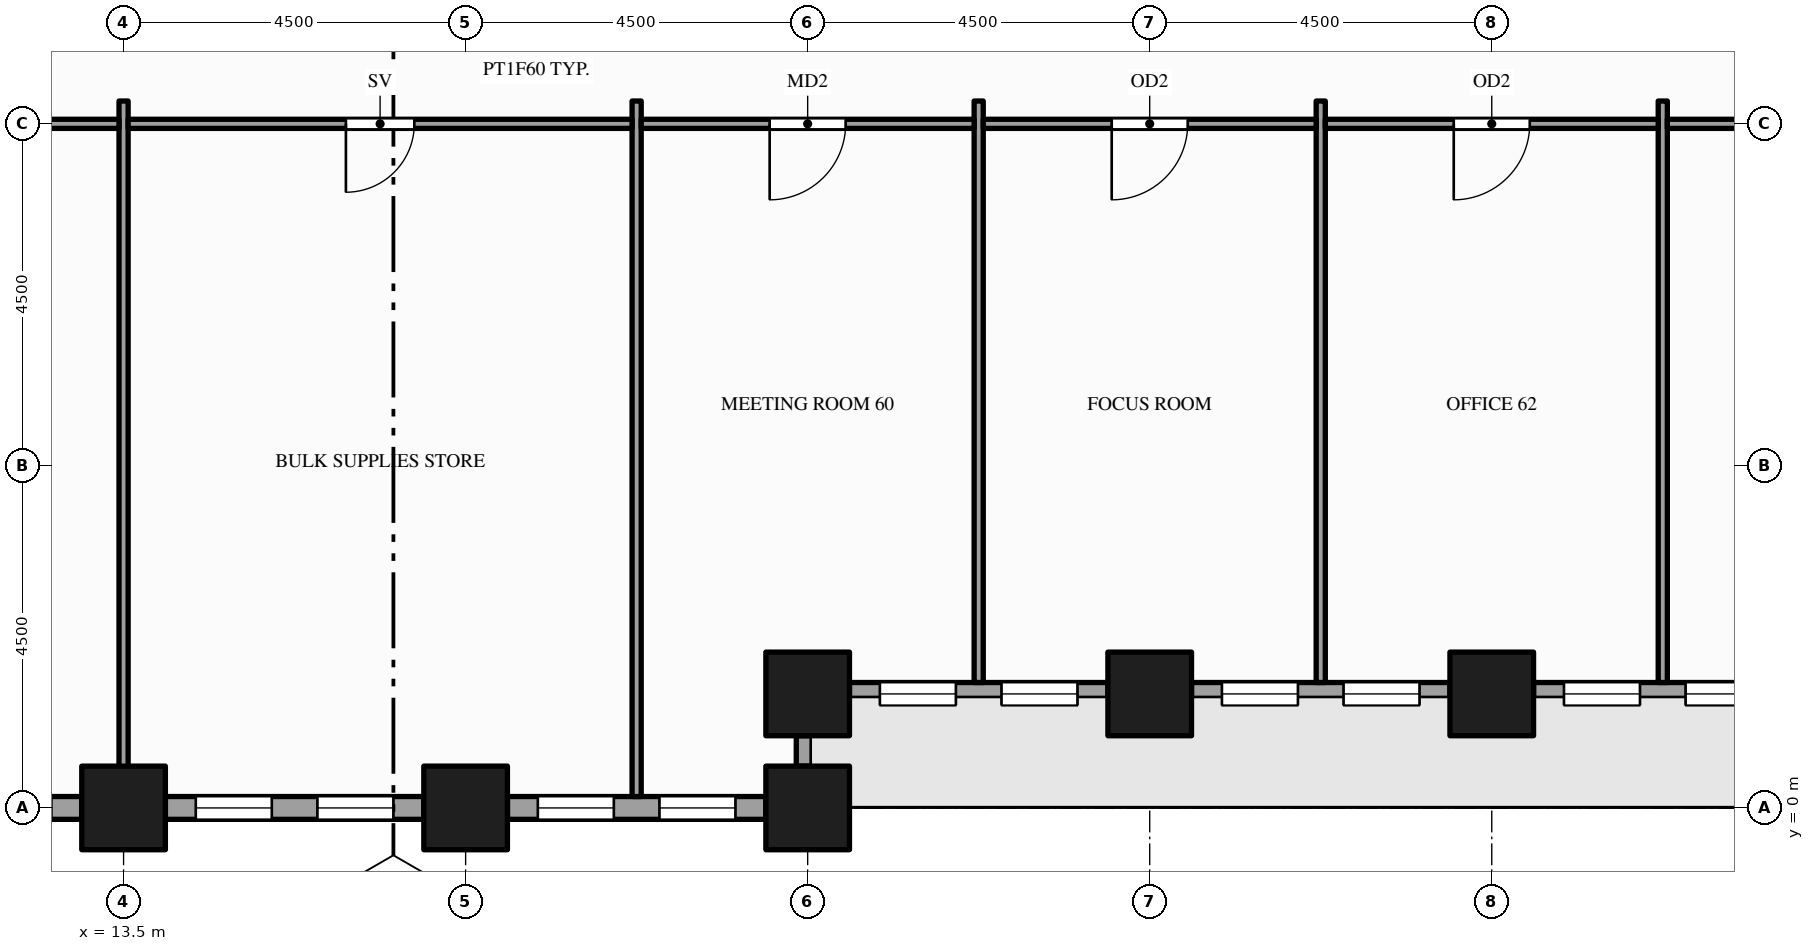
"""IFC4 building model, lengths in metres.
Left out: names, types, materials, properties, quantities, classifications, styles, units other than length and angle.
Written with IfcOpenShell. Run it as: python <this file> out.ifc"""

import sys

from ifc_helpers import new_model, si_unit, direction, frame, frame_2d, origin, origin_2d, place, context, subcontext, project, spatial, rectangle, hollow_rectangle, extrude, element, fill, save


model = new_model("IFC4")
c1 = context("Model", 3, precision=1e-05, world=origin(), true_north=direction((0.0, 1.0)))
c2 = subcontext(c1, "Body", "Model", "MODEL_VIEW")
j1 = project(units=[si_unit("LENGTHUNIT", "METRE"), si_unit("PLANEANGLEUNIT", "RADIAN")], contexts=[c1])
p1 = place(None, origin())
s1 = spatial("IfcSite", under=j1, at=p1, CompositionType="ELEMENT")
p2 = place(p1, origin())
s2 = spatial("IfcBuilding", under=s1, at=p2, CompositionType="ELEMENT")
p3 = place(p2, frame((0.0, 0.0, 29.0)))
s3 = spatial("IfcBuildingStorey", under=s2, at=p3, CompositionType="ELEMENT", Elevation=29.0)
for number, where, z_axis, x_axis in (
    (1, (13.5, 0.0, -0.15), (0.0, 0.0, 1.0), (1.0, 0.0, 0.0)),
    (2, (18.0, 0.0, -0.15), (0.0, 0.0, 1.0), (1.0, 0.0, 0.0)),
):
    element("IfcColumn", number, at=place(p3, frame(where, z_axis=z_axis, x_axis=x_axis)), inside=s3, PredefinedType="COLUMN", context=c2, shape_type="SweptSolid", body=[
        extrude(hollow_rectangle(XDim=1.1, YDim=1.1, WallThickness=0.06, at=origin_2d()), origin(), (0.0, 0.0, 1.0), 4.0),
    ])
for number, where, z_axis, x_axis in (
    (3, (22.5, 0.0, -0.3), (0.0, 0.0, 1.0), (1.0, 0.0, 0.0)),
    (4, (22.5, 1.5, -0.3), (0.0, 0.0, 1.0), (1.0, 0.0, 0.0)),
    (5, (27.0, 1.5, -0.3), (0.0, 0.0, 1.0), (1.0, 0.0, 0.0)),
    (6, (31.5, 1.5, -0.3), (0.0, 0.0, 1.0), (1.0, 0.0, 0.0)),
):
    element("IfcColumn", number, at=place(p3, frame(where, z_axis=z_axis, x_axis=x_axis)), inside=s3, PredefinedType="COLUMN", context=c2, shape_type="SweptSolid", body=[
        extrude(hollow_rectangle(XDim=1.1, YDim=1.1, WallThickness=0.06, at=origin_2d()), origin(), (0.0, 0.0, 1.0), 4.15),
    ])
p4 = place(p3, frame((9.55, 0.0, 0.0), z_axis=(0.0, 0.0, 1.0), x_axis=(1.0, 0.0, 0.0)))
e7 = element("IfcWall", 7, at=p4, inside=s3, PredefinedType="STANDARD", context=c2, shape_type="SweptSolid", body=[
    extrude(rectangle(XDim=3.4, YDim=0.3, at=frame_2d((1.7, 0.0))), origin(), (0.0, 0.0, 1.0), 3.144),
])
p5 = place(p4, frame((0.4, 0.0, 0.9)))
e8 = element("IfcOpeningElement", 8, at=p5, cuts=e7, PredefinedType="OPENING", context=c2, shape_type="SweptSolid", body=[
    extrude(rectangle(XDim=1.0, YDim=2.0, at=frame_2d((0.5, 1.0))), frame((0.0, 0.16, 0.0), z_axis=(0.0, -1.0, 0.0), x_axis=(1.0, 0.0, 0.0)), (0.0, 0.0, 1.0), 0.32),
])
p6 = place(p4, frame((2.0, 0.0, 0.9)))
e9 = element("IfcOpeningElement", 9, at=p6, cuts=e7, PredefinedType="OPENING", context=c2, shape_type="SweptSolid", body=[
    extrude(rectangle(XDim=1.0, YDim=2.0, at=frame_2d((0.5, 1.0))), frame((0.0, 0.16, 0.0), z_axis=(0.0, -1.0, 0.0), x_axis=(1.0, 0.0, 0.0)), (0.0, 0.0, 1.0), 0.32),
])
p7 = place(p3, frame((14.05, 0.0, 0.0), z_axis=(0.0, 0.0, 1.0), x_axis=(1.0, 0.0, 0.0)))
e10 = element("IfcWall", 10, at=p7, inside=s3, PredefinedType="STANDARD", context=c2, shape_type="SweptSolid", body=[
    extrude(rectangle(XDim=3.4, YDim=0.3, at=frame_2d((1.7, 0.0))), origin(), (0.0, 0.0, 1.0), 3.144),
])
p8 = place(p7, frame((0.4, 0.0, 0.9)))
e11 = element("IfcOpeningElement", 11, at=p8, cuts=e10, PredefinedType="OPENING", context=c2, shape_type="SweptSolid", body=[
    extrude(rectangle(XDim=1.0, YDim=2.0, at=frame_2d((0.5, 1.0))), frame((0.0, 0.16, 0.0), z_axis=(0.0, -1.0, 0.0), x_axis=(1.0, 0.0, 0.0)), (0.0, 0.0, 1.0), 0.32),
])
p9 = place(p7, frame((2.0, 0.0, 0.9)))
e12 = element("IfcOpeningElement", 12, at=p9, cuts=e10, PredefinedType="OPENING", context=c2, shape_type="SweptSolid", body=[
    extrude(rectangle(XDim=1.0, YDim=2.0, at=frame_2d((0.5, 1.0))), frame((0.0, 0.16, 0.0), z_axis=(0.0, -1.0, 0.0), x_axis=(1.0, 0.0, 0.0)), (0.0, 0.0, 1.0), 0.32),
])
p10 = place(p3, frame((18.55, 0.0, 0.0), z_axis=(0.0, 0.0, 1.0), x_axis=(1.0, 0.0, 0.0)))
e13 = element("IfcWall", 13, at=p10, inside=s3, PredefinedType="STANDARD", context=c2, shape_type="SweptSolid", body=[
    extrude(rectangle(XDim=3.4, YDim=0.3, at=frame_2d((1.7, 0.0))), origin(), (0.0, 0.0, 1.0), 3.144),
])
p11 = place(p10, frame((0.4, 0.0, 0.9)))
e14 = element("IfcOpeningElement", 14, at=p11, cuts=e13, PredefinedType="OPENING", context=c2, shape_type="SweptSolid", body=[
    extrude(rectangle(XDim=1.0, YDim=2.0, at=frame_2d((0.5, 1.0))), frame((0.0, 0.16, 0.0), z_axis=(0.0, -1.0, 0.0), x_axis=(1.0, 0.0, 0.0)), (0.0, 0.0, 1.0), 0.32),
])
p12 = place(p10, frame((2.0, 0.0, 0.9)))
e15 = element("IfcOpeningElement", 15, at=p12, cuts=e13, PredefinedType="OPENING", context=c2, shape_type="SweptSolid", body=[
    extrude(rectangle(XDim=1.0, YDim=2.0, at=frame_2d((0.5, 1.0))), frame((0.0, 0.16, 0.0), z_axis=(0.0, -1.0, 0.0), x_axis=(1.0, 0.0, 0.0)), (0.0, 0.0, 1.0), 0.32),
])
p13 = place(p3, frame((22.5, 0.55, 0.0), z_axis=(0.0, 0.0, 1.0), x_axis=(0.0, 1.0, 0.0)))
e16 = element("IfcWall", 16, at=p13, inside=s3, PredefinedType="STANDARD", context=c2, shape_type="SweptSolid", body=[
    extrude(rectangle(XDim=0.4, YDim=0.3, at=frame_2d((0.2, 0.0))), origin(), (0.0, 0.0, 1.0), 3.144),
])
p14 = place(p3, frame((23.05, 1.5, 0.0), z_axis=(0.0, 0.0, 1.0), x_axis=(1.0, 0.0, 0.0)))
e17 = element("IfcWall", 17, at=p14, inside=s3, PredefinedType="STANDARD", context=c2, shape_type="SweptSolid", body=[
    extrude(rectangle(XDim=3.4, YDim=0.3, at=frame_2d((1.7, 0.0))), origin(), (0.0, 0.0, 1.0), 3.144),
])
p15 = place(p14, frame((0.4, 0.0, 0.9)))
e18 = element("IfcOpeningElement", 18, at=p15, cuts=e17, PredefinedType="OPENING", context=c2, shape_type="SweptSolid", body=[
    extrude(rectangle(XDim=1.0, YDim=2.0, at=frame_2d((0.5, 1.0))), frame((0.0, 0.16, 0.0), z_axis=(0.0, -1.0, 0.0), x_axis=(1.0, 0.0, 0.0)), (0.0, 0.0, 1.0), 0.32),
])
p16 = place(p14, frame((2.0, 0.0, 0.9)))
e19 = element("IfcOpeningElement", 19, at=p16, cuts=e17, PredefinedType="OPENING", context=c2, shape_type="SweptSolid", body=[
    extrude(rectangle(XDim=1.0, YDim=2.0, at=frame_2d((0.5, 1.0))), frame((0.0, 0.16, 0.0), z_axis=(0.0, -1.0, 0.0), x_axis=(1.0, 0.0, 0.0)), (0.0, 0.0, 1.0), 0.32),
])
p17 = place(p3, frame((27.55, 1.5, 0.0), z_axis=(0.0, 0.0, 1.0), x_axis=(1.0, 0.0, 0.0)))
e20 = element("IfcWall", 20, at=p17, inside=s3, PredefinedType="STANDARD", context=c2, shape_type="SweptSolid", body=[
    extrude(rectangle(XDim=3.4, YDim=0.3, at=frame_2d((1.7, 0.0))), origin(), (0.0, 0.0, 1.0), 3.144),
])
p18 = place(p17, frame((0.4, 0.0, 0.9)))
e21 = element("IfcOpeningElement", 21, at=p18, cuts=e20, PredefinedType="OPENING", context=c2, shape_type="SweptSolid", body=[
    extrude(rectangle(XDim=1.0, YDim=2.0, at=frame_2d((0.5, 1.0))), frame((0.0, 0.16, 0.0), z_axis=(0.0, -1.0, 0.0), x_axis=(1.0, 0.0, 0.0)), (0.0, 0.0, 1.0), 0.32),
])
p19 = place(p17, frame((2.0, 0.0, 0.9)))
e22 = element("IfcOpeningElement", 22, at=p19, cuts=e20, PredefinedType="OPENING", context=c2, shape_type="SweptSolid", body=[
    extrude(rectangle(XDim=1.0, YDim=2.0, at=frame_2d((0.5, 1.0))), frame((0.0, 0.16, 0.0), z_axis=(0.0, -1.0, 0.0), x_axis=(1.0, 0.0, 0.0)), (0.0, 0.0, 1.0), 0.32),
])
p20 = place(p3, frame((32.05, 1.5, 0.0), z_axis=(0.0, 0.0, 1.0), x_axis=(1.0, 0.0, 0.0)))
e23 = element("IfcWall", 23, at=p20, inside=s3, PredefinedType="STANDARD", context=c2, shape_type="SweptSolid", body=[
    extrude(rectangle(XDim=3.4, YDim=0.3, at=frame_2d((1.7, 0.0))), origin(), (0.0, 0.0, 1.0), 3.144),
])
p21 = place(p20, frame((0.4, 0.0, 0.9)))
e24 = element("IfcOpeningElement", 24, at=p21, cuts=e23, PredefinedType="OPENING", context=c2, shape_type="SweptSolid", body=[
    extrude(rectangle(XDim=1.0, YDim=2.0, at=frame_2d((0.5, 1.0))), frame((0.0, 0.16, 0.0), z_axis=(0.0, -1.0, 0.0), x_axis=(1.0, 0.0, 0.0)), (0.0, 0.0, 1.0), 0.32),
])
p22 = place(p20, frame((2.0, 0.0, 0.9)))
e25 = element("IfcOpeningElement", 25, at=p22, cuts=e23, PredefinedType="OPENING", context=c2, shape_type="SweptSolid", body=[
    extrude(rectangle(XDim=1.0, YDim=2.0, at=frame_2d((0.5, 1.0))), frame((0.0, 0.16, 0.0), z_axis=(0.0, -1.0, 0.0), x_axis=(1.0, 0.0, 0.0)), (0.0, 0.0, 1.0), 0.32),
])
for number, where, z_axis, x_axis in (
    (26, (13.5, 0.15, 0.0), (0.0, 0.0, 1.0), (0.0, 1.0, 0.0)),
    (27, (20.25, 0.15, 0.0), (0.0, 0.0, 1.0), (0.0, 1.0, 0.0)),
):
    element("IfcWall", number, at=place(p3, frame(where, z_axis=z_axis, x_axis=x_axis)), inside=s3, PredefinedType="PARTITIONING", context=c2, shape_type="SweptSolid", body=[
        extrude(rectangle(XDim=9.15, YDim=0.12, at=frame_2d((4.575, 0.0))), origin(), (0.0, 0.0, 1.0), 2.938),
    ])
for number, where, z_axis, x_axis in (
    (28, (24.75, 1.65, 0.0), (0.0, 0.0, 1.0), (0.0, 1.0, 0.0)),
    (29, (29.25, 1.65, 0.0), (0.0, 0.0, 1.0), (0.0, 1.0, 0.0)),
    (30, (33.75, 1.65, 0.0), (0.0, 0.0, 1.0), (0.0, 1.0, 0.0)),
):
    element("IfcWall", number, at=place(p3, frame(where, z_axis=z_axis, x_axis=x_axis)), inside=s3, PredefinedType="PARTITIONING", context=c2, shape_type="SweptSolid", body=[
        extrude(rectangle(XDim=7.65, YDim=0.12, at=frame_2d((3.825, 0.0))), origin(), (0.0, 0.0, 1.0), 2.938),
    ])
p23 = place(p3, frame((9.06, 9.0, 0.0), z_axis=(0.0, 0.0, 1.0), x_axis=(1.0, 0.0, 0.0)))
e31 = element("IfcWall", 31, at=p23, inside=s3, PredefinedType="PARTITIONING", context=c2, shape_type="SweptSolid", body=[
    extrude(rectangle(XDim=4.38, YDim=0.12, at=frame_2d((2.19, 0.0))), origin(), (0.0, 0.0, 1.0), 2.938),
])
p24 = place(p23, frame((1.69, 0.0, 0.0)))
e32 = element("IfcOpeningElement", 32, at=p24, cuts=e31, PredefinedType="OPENING", context=c2, shape_type="SweptSolid", body=[
    extrude(rectangle(XDim=1.0, YDim=2.1, at=frame_2d((0.5, 1.05))), frame((0.0, 0.07, 0.0), z_axis=(0.0, -1.0, 0.0), x_axis=(1.0, 0.0, 0.0)), (0.0, 0.0, 1.0), 0.14),
])
p25 = place(p3, frame((13.56, 9.0, 0.0), z_axis=(0.0, 0.0, 1.0), x_axis=(1.0, 0.0, 0.0)))
e33 = element("IfcWall", 33, at=p25, inside=s3, PredefinedType="PARTITIONING", context=c2, shape_type="SweptSolid", body=[
    extrude(rectangle(XDim=6.63, YDim=0.12, at=frame_2d((3.315, 0.0))), origin(), (0.0, 0.0, 1.0), 2.938),
])
p26 = place(p25, frame((2.865, 0.0, 0.0)))
e34 = element("IfcOpeningElement", 34, at=p26, cuts=e33, PredefinedType="OPENING", context=c2, shape_type="SweptSolid", body=[
    extrude(rectangle(XDim=0.9, YDim=2.1, at=frame_2d((0.45, 1.05))), frame((0.0, 0.07, 0.0), z_axis=(0.0, -1.0, 0.0), x_axis=(1.0, 0.0, 0.0)), (0.0, 0.0, 1.0), 0.14),
])
p27 = place(p3, frame((20.31, 9.0, 0.0), z_axis=(0.0, 0.0, 1.0), x_axis=(1.0, 0.0, 0.0)))
e35 = element("IfcWall", 35, at=p27, inside=s3, PredefinedType="PARTITIONING", context=c2, shape_type="SweptSolid", body=[
    extrude(rectangle(XDim=4.38, YDim=0.12, at=frame_2d((2.19, 0.0))), origin(), (0.0, 0.0, 1.0), 2.938),
])
p28 = place(p27, frame((1.69, 0.0, 0.0)))
e36 = element("IfcOpeningElement", 36, at=p28, cuts=e35, PredefinedType="OPENING", context=c2, shape_type="SweptSolid", body=[
    extrude(rectangle(XDim=1.0, YDim=2.1, at=frame_2d((0.5, 1.05))), frame((0.0, 0.07, 0.0), z_axis=(0.0, -1.0, 0.0), x_axis=(1.0, 0.0, 0.0)), (0.0, 0.0, 1.0), 0.14),
])
p29 = place(p3, frame((24.81, 9.0, 0.0), z_axis=(0.0, 0.0, 1.0), x_axis=(1.0, 0.0, 0.0)))
e37 = element("IfcWall", 37, at=p29, inside=s3, PredefinedType="PARTITIONING", context=c2, shape_type="SweptSolid", body=[
    extrude(rectangle(XDim=4.38, YDim=0.12, at=frame_2d((2.19, 0.0))), origin(), (0.0, 0.0, 1.0), 2.938),
])
p30 = place(p29, frame((1.69, 0.0, 0.0)))
e38 = element("IfcOpeningElement", 38, at=p30, cuts=e37, PredefinedType="OPENING", context=c2, shape_type="SweptSolid", body=[
    extrude(rectangle(XDim=1.0, YDim=2.1, at=frame_2d((0.5, 1.05))), frame((0.0, 0.07, 0.0), z_axis=(0.0, -1.0, 0.0), x_axis=(1.0, 0.0, 0.0)), (0.0, 0.0, 1.0), 0.14),
])
p31 = place(p3, frame((29.31, 9.0, 0.0), z_axis=(0.0, 0.0, 1.0), x_axis=(1.0, 0.0, 0.0)))
e39 = element("IfcWall", 39, at=p31, inside=s3, PredefinedType="PARTITIONING", context=c2, shape_type="SweptSolid", body=[
    extrude(rectangle(XDim=4.38, YDim=0.12, at=frame_2d((2.19, 0.0))), origin(), (0.0, 0.0, 1.0), 2.938),
])
p32 = place(p31, frame((1.69, 0.0, 0.0)))
e40 = element("IfcOpeningElement", 40, at=p32, cuts=e39, PredefinedType="OPENING", context=c2, shape_type="SweptSolid", body=[
    extrude(rectangle(XDim=1.0, YDim=2.1, at=frame_2d((0.5, 1.05))), frame((0.0, 0.07, 0.0), z_axis=(0.0, -1.0, 0.0), x_axis=(1.0, 0.0, 0.0)), (0.0, 0.0, 1.0), 0.14),
])
p33 = place(p3, frame((33.81, 9.0, 0.0), z_axis=(0.0, 0.0, 1.0), x_axis=(1.0, 0.0, 0.0)))
e41 = element("IfcWall", 41, at=p33, inside=s3, PredefinedType="PARTITIONING", context=c2, shape_type="SweptSolid", body=[
    extrude(rectangle(XDim=6.63, YDim=0.12, at=frame_2d((3.315, 0.0))), origin(), (0.0, 0.0, 1.0), 2.938),
])
p34 = place(p33, frame((2.865, 0.0, 0.0)))
e42 = element("IfcOpeningElement", 42, at=p34, cuts=e41, PredefinedType="OPENING", context=c2, shape_type="SweptSolid", body=[
    extrude(rectangle(XDim=0.9, YDim=2.1, at=frame_2d((0.45, 1.05))), frame((0.0, 0.07, 0.0), z_axis=(0.0, -1.0, 0.0), x_axis=(1.0, 0.0, 0.0)), (0.0, 0.0, 1.0), 0.14),
])
p35 = place(p8, origin())
e43 = element("IfcWindow", 43, at=p35, inside=s3, PartitioningType="SINGLE_PANEL", PredefinedType="WINDOW", context=c2, shape_type="SweptSolid", body=[
    extrude(rectangle(XDim=1.0, YDim=2.0, at=frame_2d((0.5, 1.0))), frame((0.0, 0.03, 0.0), z_axis=(0.0, -1.0, 0.0), x_axis=(1.0, 0.0, 0.0)), (0.0, 0.0, 1.0), 0.06),
])
fill(e11, e43)
p36 = place(p9, origin())
e44 = element("IfcWindow", 44, at=p36, inside=s3, PartitioningType="SINGLE_PANEL", PredefinedType="WINDOW", context=c2, shape_type="SweptSolid", body=[
    extrude(rectangle(XDim=1.0, YDim=2.0, at=frame_2d((0.5, 1.0))), frame((0.0, 0.03, 0.0), z_axis=(0.0, -1.0, 0.0), x_axis=(1.0, 0.0, 0.0)), (0.0, 0.0, 1.0), 0.06),
])
fill(e12, e44)
p37 = place(p11, origin())
e45 = element("IfcWindow", 45, at=p37, inside=s3, PartitioningType="SINGLE_PANEL", PredefinedType="WINDOW", context=c2, shape_type="SweptSolid", body=[
    extrude(rectangle(XDim=1.0, YDim=2.0, at=frame_2d((0.5, 1.0))), frame((0.0, 0.03, 0.0), z_axis=(0.0, -1.0, 0.0), x_axis=(1.0, 0.0, 0.0)), (0.0, 0.0, 1.0), 0.06),
])
fill(e14, e45)
p38 = place(p12, origin())
e46 = element("IfcWindow", 46, at=p38, inside=s3, PartitioningType="SINGLE_PANEL", PredefinedType="WINDOW", context=c2, shape_type="SweptSolid", body=[
    extrude(rectangle(XDim=1.0, YDim=2.0, at=frame_2d((0.5, 1.0))), frame((0.0, 0.03, 0.0), z_axis=(0.0, -1.0, 0.0), x_axis=(1.0, 0.0, 0.0)), (0.0, 0.0, 1.0), 0.06),
])
fill(e15, e46)
p39 = place(p15, origin())
e47 = element("IfcWindow", 47, at=p39, inside=s3, PartitioningType="SINGLE_PANEL", PredefinedType="WINDOW", context=c2, shape_type="SweptSolid", body=[
    extrude(rectangle(XDim=1.0, YDim=2.0, at=frame_2d((0.5, 1.0))), frame((0.0, 0.03, 0.0), z_axis=(0.0, -1.0, 0.0), x_axis=(1.0, 0.0, 0.0)), (0.0, 0.0, 1.0), 0.06),
])
fill(e18, e47)
p40 = place(p16, origin())
e48 = element("IfcWindow", 48, at=p40, inside=s3, PartitioningType="SINGLE_PANEL", PredefinedType="WINDOW", context=c2, shape_type="SweptSolid", body=[
    extrude(rectangle(XDim=1.0, YDim=2.0, at=frame_2d((0.5, 1.0))), frame((0.0, 0.03, 0.0), z_axis=(0.0, -1.0, 0.0), x_axis=(1.0, 0.0, 0.0)), (0.0, 0.0, 1.0), 0.06),
])
fill(e19, e48)
p41 = place(p18, origin())
e49 = element("IfcWindow", 49, at=p41, inside=s3, PartitioningType="SINGLE_PANEL", PredefinedType="WINDOW", context=c2, shape_type="SweptSolid", body=[
    extrude(rectangle(XDim=1.0, YDim=2.0, at=frame_2d((0.5, 1.0))), frame((0.0, 0.03, 0.0), z_axis=(0.0, -1.0, 0.0), x_axis=(1.0, 0.0, 0.0)), (0.0, 0.0, 1.0), 0.06),
])
fill(e21, e49)
p42 = place(p19, origin())
e50 = element("IfcWindow", 50, at=p42, inside=s3, PartitioningType="SINGLE_PANEL", PredefinedType="WINDOW", context=c2, shape_type="SweptSolid", body=[
    extrude(rectangle(XDim=1.0, YDim=2.0, at=frame_2d((0.5, 1.0))), frame((0.0, 0.03, 0.0), z_axis=(0.0, -1.0, 0.0), x_axis=(1.0, 0.0, 0.0)), (0.0, 0.0, 1.0), 0.06),
])
fill(e22, e50)
p43 = place(p21, origin())
e51 = element("IfcWindow", 51, at=p43, inside=s3, PartitioningType="SINGLE_PANEL", PredefinedType="WINDOW", context=c2, shape_type="SweptSolid", body=[
    extrude(rectangle(XDim=1.0, YDim=2.0, at=frame_2d((0.5, 1.0))), frame((0.0, 0.03, 0.0), z_axis=(0.0, -1.0, 0.0), x_axis=(1.0, 0.0, 0.0)), (0.0, 0.0, 1.0), 0.06),
])
fill(e24, e51)
p44 = place(p22, origin())
e52 = element("IfcWindow", 52, at=p44, inside=s3, PartitioningType="SINGLE_PANEL", PredefinedType="WINDOW", context=c2, shape_type="SweptSolid", body=[
    extrude(rectangle(XDim=1.0, YDim=2.0, at=frame_2d((0.5, 1.0))), frame((0.0, 0.03, 0.0), z_axis=(0.0, -1.0, 0.0), x_axis=(1.0, 0.0, 0.0)), (0.0, 0.0, 1.0), 0.06),
])
fill(e25, e52)
p45 = place(p26, origin())
e53 = element("IfcDoor", 53, at=p45, inside=s3, OperationType="SINGLE_SWING_LEFT", PredefinedType="DOOR", context=c2, shape_type="SweptSolid", body=[
    extrude(rectangle(XDim=0.9, YDim=2.1, at=frame_2d((0.45, 1.05))), frame((0.0, 0.025, 0.0), z_axis=(0.0, -1.0, 0.0), x_axis=(1.0, 0.0, 0.0)), (0.0, 0.0, 1.0), 0.05),
])
fill(e34, e53)
p46 = place(p28, origin())
e54 = element("IfcDoor", 54, at=p46, inside=s3, OperationType="SINGLE_SWING_LEFT", PredefinedType="DOOR", context=c2, shape_type="SweptSolid", body=[
    extrude(rectangle(XDim=1.0, YDim=2.1, at=frame_2d((0.5, 1.05))), frame((0.0, 0.025, 0.0), z_axis=(0.0, -1.0, 0.0), x_axis=(1.0, 0.0, 0.0)), (0.0, 0.0, 1.0), 0.05),
])
fill(e36, e54)
p47 = place(p30, origin())
e55 = element("IfcDoor", 55, at=p47, inside=s3, OperationType="SINGLE_SWING_LEFT", PredefinedType="DOOR", context=c2, shape_type="SweptSolid", body=[
    extrude(rectangle(XDim=1.0, YDim=2.1, at=frame_2d((0.5, 1.05))), frame((0.0, 0.025, 0.0), z_axis=(0.0, -1.0, 0.0), x_axis=(1.0, 0.0, 0.0)), (0.0, 0.0, 1.0), 0.05),
])
fill(e38, e55)
p48 = place(p32, origin())
e56 = element("IfcDoor", 56, at=p48, inside=s3, OperationType="SINGLE_SWING_LEFT", PredefinedType="DOOR", context=c2, shape_type="SweptSolid", body=[
    extrude(rectangle(XDim=1.0, YDim=2.1, at=frame_2d((0.5, 1.05))), frame((0.0, 0.025, 0.0), z_axis=(0.0, -1.0, 0.0), x_axis=(1.0, 0.0, 0.0)), (0.0, 0.0, 1.0), 0.05),
])
fill(e40, e56)
save(model, sys.argv[1])
